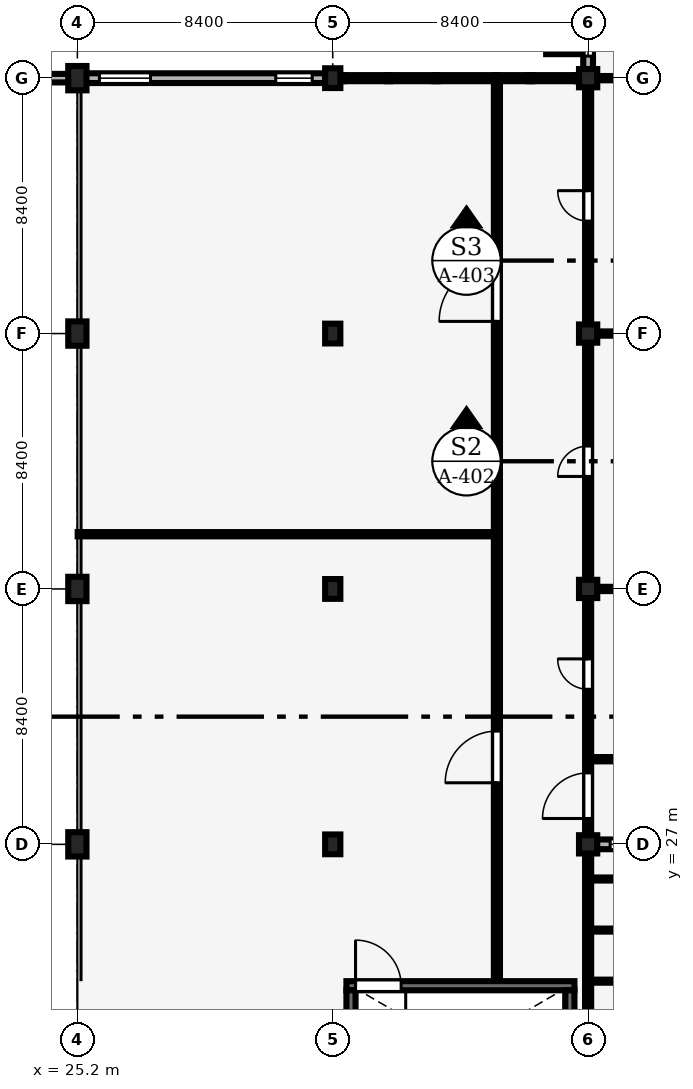
"""IFC4 building model, lengths in metres.
Left out: names, types, materials, properties, quantities, classifications, styles, units other than length and angle.
Written with IfcOpenShell. Run it as: python <this file> out.ifc"""

import sys

from ifc_helpers import new_model, si_unit, direction, frame, frame_2d, origin, origin_2d, place, context, subcontext, project, spatial, rectangle, extrude, element, fill, save


model = new_model("IFC4")
c1 = context("Model", 3, precision=1e-05, world=origin(), true_north=direction((0.0, 1.0)))
c2 = subcontext(c1, "Body", "Model", "MODEL_VIEW")
j1 = project(units=[si_unit("LENGTHUNIT", "METRE"), si_unit("PLANEANGLEUNIT", "RADIAN")], contexts=[c1])
p1 = place(None, origin())
s1 = spatial("IfcSite", under=j1, at=p1, CompositionType="ELEMENT")
p2 = place(p1, origin())
s2 = spatial("IfcBuilding", under=s1, at=p2, CompositionType="ELEMENT")
p3 = place(p2, frame((0.0, 0.0, 4.8)))
s3 = spatial("IfcBuildingStorey", under=s2, at=p3, CompositionType="ELEMENT", Elevation=4.8)
for number, where, z_axis, x_axis in (
    (1, (25.2, 27.0, 0.0), (0.0, 0.0, 1.0), (1.0, 0.0, 0.0)),
    (2, (25.2, 35.4, 0.0), (0.0, 0.0, 1.0), (1.0, 0.0, 0.0)),
    (3, (25.2, 43.8, 0.0), (0.0, 0.0, 1.0), (1.0, 0.0, 0.0)),
    (4, (25.2, 52.2, 0.0), (0.0, 0.0, 1.0), (1.0, 0.0, 0.0)),
):
    element("IfcColumn", number, at=place(p3, frame(where, z_axis=z_axis, x_axis=x_axis)), inside=s3, PredefinedType="COLUMN", context=c2, shape_type="SweptSolid", body=[
        extrude(rectangle(XDim=0.6, YDim=0.8, at=origin_2d()), origin(), (0.0, 0.0, 1.0), 4.2),
    ])
for number, where, z_axis, x_axis in (
    (5, (33.6, 27.0, 0.0), (0.0, 0.0, 1.0), (1.0, 0.0, 0.0)),
    (6, (33.6, 35.4, 0.0), (0.0, 0.0, 1.0), (1.0, 0.0, 0.0)),
    (7, (33.6, 43.8, 0.0), (0.0, 0.0, 1.0), (1.0, 0.0, 0.0)),
    (8, (33.6, 52.2, 0.0), (0.0, 0.0, 1.0), (1.0, 0.0, 0.0)),
):
    element("IfcColumn", number, at=place(p3, frame(where, z_axis=z_axis, x_axis=x_axis)), inside=s3, PredefinedType="COLUMN", context=c2, shape_type="SweptSolid", body=[
        extrude(rectangle(XDim=0.5, YDim=0.65, at=origin_2d()), origin(), (0.0, 0.0, 1.0), 4.2),
    ])
for number, where, z_axis, x_axis in (
    (9, (42.0, 27.0, 0.0), (0.0, 0.0, 1.0), (1.0, 0.0, 0.0)),
    (10, (42.0, 35.4, 0.0), (0.0, 0.0, 1.0), (1.0, 0.0, 0.0)),
    (11, (42.0, 43.8, 0.0), (0.0, 0.0, 1.0), (1.0, 0.0, 0.0)),
    (12, (42.0, 52.2, 0.0), (0.0, 0.0, 1.0), (1.0, 0.0, 0.0)),
):
    element("IfcColumn", number, at=place(p3, frame(where, z_axis=z_axis, x_axis=x_axis)), inside=s3, PredefinedType="COLUMN", context=c2, shape_type="SweptSolid", body=[
        extrude(rectangle(XDim=0.6, YDim=0.6, at=origin_2d()), origin(), (0.0, 0.0, 1.0), 4.2),
    ])
p4 = place(p3, frame((42.0, 52.475, 0.0), z_axis=(0.0, 0.0, 1.0), x_axis=(0.0, 1.0, 0.0)))
e13 = element("IfcWall", 13, at=p4, inside=s3, PredefinedType="SOLIDWALL", context=c2, shape_type="SweptSolid", body=[
    extrude(rectangle(XDim=7.85, YDim=0.32, at=frame_2d((3.925, 0.0))), origin(), (0.0, 0.0, 1.0), 3.352),
])
p5 = place(p4, frame((0.45, 0.0, 0.85)))
e14 = element("IfcOpeningElement", 14, at=p5, cuts=e13, PredefinedType="OPENING", context=c2, shape_type="SweptSolid", body=[
    extrude(rectangle(XDim=1.2, YDim=1.5, at=frame_2d((0.6, 0.75))), frame((0.0, 0.17, 0.0), z_axis=(0.0, -1.0, 0.0), x_axis=(1.0, 0.0, 0.0)), (0.0, 0.0, 1.0), 0.34),
])
p6 = place(p4, frame((6.2, 0.0, 0.85)))
e15 = element("IfcOpeningElement", 15, at=p6, cuts=e13, PredefinedType="OPENING", context=c2, shape_type="SweptSolid", body=[
    extrude(rectangle(XDim=1.2, YDim=1.5, at=frame_2d((0.6, 0.75))), frame((0.0, 0.17, 0.0), z_axis=(0.0, -1.0, 0.0), x_axis=(1.0, 0.0, 0.0)), (0.0, 0.0, 1.0), 0.34),
])
p7 = place(p3, frame((25.475, 52.2, 0.0), z_axis=(0.0, 0.0, 1.0), x_axis=(1.0, 0.0, 0.0)))
e16 = element("IfcWall", 16, at=p7, inside=s3, PredefinedType="SOLIDWALL", context=c2, shape_type="SweptSolid", body=[
    extrude(rectangle(XDim=7.9, YDim=0.32, at=frame_2d((3.95, 0.0))), origin(), (0.0, 0.0, 1.0), 3.48),
])
p8 = place(p7, frame((0.45, 0.0, 0.9)))
e17 = element("IfcOpeningElement", 17, at=p8, cuts=e16, PredefinedType="OPENING", context=c2, shape_type="SweptSolid", body=[
    extrude(rectangle(XDim=1.68, YDim=2.4, at=frame_2d((0.84, 1.2))), frame((0.0, 0.17, 0.0), z_axis=(0.0, -1.0, 0.0), x_axis=(1.0, 0.0, 0.0)), (0.0, 0.0, 1.0), 0.34),
])
p9 = place(p7, frame((6.25, 0.0, 0.9)))
e18 = element("IfcOpeningElement", 18, at=p9, cuts=e16, PredefinedType="OPENING", context=c2, shape_type="SweptSolid", body=[
    extrude(rectangle(XDim=1.2, YDim=1.5, at=frame_2d((0.6, 0.75))), frame((0.0, 0.17, 0.0), z_axis=(0.0, -1.0, 0.0), x_axis=(1.0, 0.0, 0.0)), (0.0, 0.0, 1.0), 0.34),
])
p10 = place(p3, frame((17.075, 52.2, 0.0), z_axis=(0.0, 0.0, 1.0), x_axis=(1.0, 0.0, 0.0)))
e19 = element("IfcWall", 19, at=p10, inside=s3, PredefinedType="SOLIDWALL", context=c2, shape_type="SweptSolid", body=[
    extrude(rectangle(XDim=7.85, YDim=0.28, at=frame_2d((3.925, 0.0))), origin(), (0.0, 0.0, 1.0), 2.759),
])
p11 = place(p10, frame((2.425, 0.0, 1.25)))
e20 = element("IfcOpeningElement", 20, at=p11, cuts=e19, PredefinedType="OPENING", context=c2, shape_type="SweptSolid", body=[
    extrude(rectangle(XDim=3.0, YDim=1.359, at=frame_2d((1.5, 0.679))), frame((0.0, 0.15, 0.0), z_axis=(0.0, -1.0, 0.0), x_axis=(1.0, 0.0, 0.0)), (0.0, 0.0, 1.0), 0.3),
])
p12 = place(p3, frame((42.275, 27.0, 0.0), z_axis=(0.0, 0.0, 1.0), x_axis=(1.0, 0.0, 0.0)))
e21 = element("IfcWall", 21, at=p12, inside=s3, PredefinedType="SOLIDWALL", context=c2, shape_type="SweptSolid", body=[
    extrude(rectangle(XDim=7.85, YDim=0.32, at=frame_2d((3.925, 0.0))), origin(), (0.0, 0.0, 1.0), 3.13),
])
p13 = place(p12, frame((0.45, 0.0, 0.9)))
e22 = element("IfcOpeningElement", 22, at=p13, cuts=e21, PredefinedType="OPENING", context=c2, shape_type="SweptSolid", body=[
    extrude(rectangle(XDim=1.2, YDim=1.5, at=frame_2d((0.6, 0.75))), frame((0.0, 0.17, 0.0), z_axis=(0.0, -1.0, 0.0), x_axis=(1.0, 0.0, 0.0)), (0.0, 0.0, 1.0), 0.34),
])
p14 = place(p12, frame((6.2, 0.0, 0.9)))
e23 = element("IfcOpeningElement", 23, at=p14, cuts=e21, PredefinedType="OPENING", context=c2, shape_type="SweptSolid", body=[
    extrude(rectangle(XDim=1.2, YDim=1.8, at=frame_2d((0.6, 0.9))), frame((0.0, 0.17, 0.0), z_axis=(0.0, -1.0, 0.0), x_axis=(1.0, 0.0, 0.0)), (0.0, 0.0, 1.0), 0.34),
])
p15 = place(p3, frame((34.05, 22.35, 0.0), z_axis=(0.0, 0.0, 1.0), x_axis=(1.0, 0.0, 0.0)))
e24 = element("IfcWall", 24, at=p15, inside=s3, PredefinedType="SHEAR", context=c2, shape_type="SweptSolid", body=[
    extrude(rectangle(XDim=7.5, YDim=0.3, at=frame_2d((3.75, 0.0))), origin(), (0.0, 0.0, 1.0), 4.025),
])
p16 = place(p15, frame((0.3, 0.0, 0.0)))
e25 = element("IfcOpeningElement", 25, at=p16, cuts=e24, PredefinedType="OPENING", context=c2, shape_type="SweptSolid", body=[
    extrude(rectangle(XDim=1.5, YDim=2.2, at=frame_2d((0.75, 1.1))), frame((0.0, 0.16, 0.0), z_axis=(0.0, -1.0, 0.0), x_axis=(1.0, 0.0, 0.0)), (0.0, 0.0, 1.0), 0.32),
])
for number, where, z_axis, x_axis in (
    (26, (34.2, 18.3, 0.0), (0.0, 0.0, 1.0), (0.0, 1.0, 0.0)),
    (27, (41.4, 18.3, 0.0), (0.0, 0.0, 1.0), (0.0, 1.0, 0.0)),
):
    element("IfcWall", number, at=place(p3, frame(where, z_axis=z_axis, x_axis=x_axis)), inside=s3, PredefinedType="SHEAR", context=c2, shape_type="SweptSolid", body=[
        extrude(rectangle(XDim=3.9, YDim=0.3, at=frame_2d((1.95, 0.0))), origin(), (0.0, 0.0, 1.0), 4.025),
    ])
p17 = place(p3, frame((25.21, 37.2, 0.0), z_axis=(0.0, 0.0, 1.0), x_axis=(1.0, 0.0, 0.0)))
e28 = element("IfcWall", 28, at=p17, inside=s3, PredefinedType="PARTITIONING", context=c2, shape_type="SweptSolid", body=[
    extrude(rectangle(XDim=13.685, YDim=0.14, at=frame_2d((6.843, 0.0))), origin(), (0.0, 0.0, 1.0), 3.9),
])
p18 = place(p3, frame((39.0, 22.56, 0.0), z_axis=(0.0, 0.0, 1.0), x_axis=(0.0, 1.0, 0.0)))
e29 = element("IfcWall", 29, at=p18, inside=s3, PredefinedType="PARTITIONING", context=c2, shape_type="SweptSolid", body=[
    extrude(rectangle(XDim=29.535, YDim=0.2, at=frame_2d((14.768, 0.0))), origin(), (0.0, 0.0, 1.0), 3.9),
])
p19 = place(p18, frame((6.465, 0.0, 0.0)))
e30 = element("IfcOpeningElement", 30, at=p19, cuts=e29, PredefinedType="OPENING", context=c2, shape_type="SweptSolid", body=[
    extrude(rectangle(XDim=1.7, YDim=2.25, at=frame_2d((0.85, 1.125))), frame((0.0, 0.11, 0.0), z_axis=(0.0, -1.0, 0.0), x_axis=(1.0, 0.0, 0.0)), (0.0, 0.0, 1.0), 0.22),
])
p20 = place(p18, frame((21.64, 0.0, 0.0)))
e31 = element("IfcOpeningElement", 31, at=p20, cuts=e29, PredefinedType="OPENING", context=c2, shape_type="SweptSolid", body=[
    extrude(rectangle(XDim=1.9, YDim=2.4, at=frame_2d((0.95, 1.2))), frame((0.0, 0.11, 0.0), z_axis=(0.0, -1.0, 0.0), x_axis=(1.0, 0.0, 0.0)), (0.0, 0.0, 1.0), 0.22),
])
p21 = place(p3, frame((42.105, 29.8, 0.0), z_axis=(0.0, 0.0, 1.0), x_axis=(1.0, 0.0, 0.0)))
e32 = element("IfcWall", 32, at=p21, inside=s3, PredefinedType="PARTITIONING", context=c2, shape_type="SweptSolid", body=[
    extrude(rectangle(XDim=5.19, YDim=0.14, at=frame_2d((2.595, 0.0))), origin(), (0.0, 0.0, 1.0), 3.43),
])
p22 = place(p3, frame((42.105, 35.4, 0.0), z_axis=(0.0, 0.0, 1.0), x_axis=(1.0, 0.0, 0.0)))
e33 = element("IfcWall", 33, at=p22, inside=s3, PredefinedType="PARTITIONING", context=c2, shape_type="SweptSolid", body=[
    extrude(rectangle(XDim=5.19, YDim=0.14, at=frame_2d((2.595, 0.0))), origin(), (0.0, 0.0, 1.0), 3.23),
])
p23 = place(p3, frame((42.105, 43.8, 0.0), z_axis=(0.0, 0.0, 1.0), x_axis=(1.0, 0.0, 0.0)))
e34 = element("IfcWall", 34, at=p23, inside=s3, PredefinedType="PARTITIONING", context=c2, shape_type="SweptSolid", body=[
    extrude(rectangle(XDim=5.19, YDim=0.14, at=frame_2d((2.595, 0.0))), origin(), (0.0, 0.0, 1.0), 3.01),
])
p24 = place(p3, frame((42.165, 52.2, 0.0), z_axis=(0.0, 0.0, 1.0), x_axis=(1.0, 0.0, 0.0)))
e35 = element("IfcWall", 35, at=p24, inside=s3, PredefinedType="PARTITIONING", context=c2, shape_type="SweptSolid", body=[
    extrude(rectangle(XDim=5.13, YDim=0.14, at=frame_2d((2.565, 0.0))), origin(), (0.0, 0.0, 1.0), 3.21),
])
p25 = place(p3, frame((42.0, 27.165, 0.0), z_axis=(0.0, 0.0, 1.0), x_axis=(0.0, 1.0, 0.0)))
e36 = element("IfcWall", 36, at=p25, inside=s3, PredefinedType="PARTITIONING", context=c2, shape_type="SweptSolid", body=[
    extrude(rectangle(XDim=7.925, YDim=0.2, at=frame_2d((3.962, 0.0))), origin(), (0.0, 0.0, 1.0), 3.272),
])
p26 = place(p25, frame((0.685, 0.0, 0.0)))
e37 = element("IfcOpeningElement", 37, at=p26, cuts=e36, PredefinedType="OPENING", context=c2, shape_type="SweptSolid", body=[
    extrude(rectangle(XDim=1.5, YDim=2.2, at=frame_2d((0.75, 1.1))), frame((0.0, 0.11, 0.0), z_axis=(0.0, -1.0, 0.0), x_axis=(1.0, 0.0, 0.0)), (0.0, 0.0, 1.0), 0.22),
])
p27 = place(p25, frame((4.935, 0.0, 0.0)))
e38 = element("IfcOpeningElement", 38, at=p27, cuts=e36, PredefinedType="OPENING", context=c2, shape_type="SweptSolid", body=[
    extrude(rectangle(XDim=1.0, YDim=2.15, at=frame_2d((0.5, 1.075))), frame((0.0, 0.11, 0.0), z_axis=(0.0, -1.0, 0.0), x_axis=(1.0, 0.0, 0.0)), (0.0, 0.0, 1.0), 0.22),
])
p28 = place(p3, frame((42.0, 35.71, 0.0), z_axis=(0.0, 0.0, 1.0), x_axis=(0.0, 1.0, 0.0)))
e39 = element("IfcWall", 39, at=p28, inside=s3, PredefinedType="PARTITIONING", context=c2, shape_type="SweptSolid", body=[
    extrude(rectangle(XDim=7.78, YDim=0.2, at=frame_2d((3.89, 0.0))), origin(), (0.0, 0.0, 1.0), 3.352),
])
p29 = place(p28, frame((3.39, 0.0, 0.0)))
e40 = element("IfcOpeningElement", 40, at=p29, cuts=e39, PredefinedType="OPENING", context=c2, shape_type="SweptSolid", body=[
    extrude(rectangle(XDim=1.0, YDim=2.15, at=frame_2d((0.5, 1.075))), frame((0.0, 0.11, 0.0), z_axis=(0.0, -1.0, 0.0), x_axis=(1.0, 0.0, 0.0)), (0.0, 0.0, 1.0), 0.22),
])
p30 = place(p3, frame((42.0, 44.11, 0.0), z_axis=(0.0, 0.0, 1.0), x_axis=(0.0, 1.0, 0.0)))
e41 = element("IfcWall", 41, at=p30, inside=s3, PredefinedType="PARTITIONING", context=c2, shape_type="SweptSolid", body=[
    extrude(rectangle(XDim=7.985, YDim=0.2, at=frame_2d((3.992, 0.0))), origin(), (0.0, 0.0, 1.0), 3.352),
])
p31 = place(p30, frame((3.39, 0.0, 0.0)))
e42 = element("IfcOpeningElement", 42, at=p31, cuts=e41, PredefinedType="OPENING", context=c2, shape_type="SweptSolid", body=[
    extrude(rectangle(XDim=1.0, YDim=2.15, at=frame_2d((0.5, 1.075))), frame((0.0, 0.11, 0.0), z_axis=(0.0, -1.0, 0.0), x_axis=(1.0, 0.0, 0.0)), (0.0, 0.0, 1.0), 0.22),
])
p32 = place(p5, origin())
e43 = element("IfcWindow", 43, at=p32, inside=s3, PartitioningType="SINGLE_PANEL", PredefinedType="WINDOW", context=c2, shape_type="SweptSolid", body=[
    extrude(rectangle(XDim=1.2, YDim=1.5, at=frame_2d((0.6, 0.75))), frame((0.0, 0.03, 0.0), z_axis=(0.0, -1.0, 0.0), x_axis=(1.0, 0.0, 0.0)), (0.0, 0.0, 1.0), 0.06),
])
fill(e14, e43)
p33 = place(p8, origin())
e44 = element("IfcWindow", 44, at=p33, inside=s3, PartitioningType="SINGLE_PANEL", PredefinedType="WINDOW", context=c2, shape_type="SweptSolid", body=[
    extrude(rectangle(XDim=1.68, YDim=2.4, at=frame_2d((0.84, 1.2))), frame((0.0, 0.03, 0.0), z_axis=(0.0, -1.0, 0.0), x_axis=(1.0, 0.0, 0.0)), (0.0, 0.0, 1.0), 0.06),
])
fill(e17, e44)
p34 = place(p9, origin())
e45 = element("IfcWindow", 45, at=p34, inside=s3, PartitioningType="SINGLE_PANEL", PredefinedType="WINDOW", context=c2, shape_type="SweptSolid", body=[
    extrude(rectangle(XDim=1.2, YDim=1.5, at=frame_2d((0.6, 0.75))), frame((0.0, 0.03, 0.0), z_axis=(0.0, -1.0, 0.0), x_axis=(1.0, 0.0, 0.0)), (0.0, 0.0, 1.0), 0.06),
])
fill(e18, e45)
p35 = place(p13, origin())
e46 = element("IfcWindow", 46, at=p35, inside=s3, PartitioningType="SINGLE_PANEL", PredefinedType="WINDOW", context=c2, shape_type="SweptSolid", body=[
    extrude(rectangle(XDim=1.2, YDim=1.5, at=frame_2d((0.6, 0.75))), frame((0.0, 0.03, 0.0), z_axis=(0.0, -1.0, 0.0), x_axis=(1.0, 0.0, 0.0)), (0.0, 0.0, 1.0), 0.06),
])
fill(e22, e46)
p36 = place(p16, origin())
e47 = element("IfcDoor", 47, at=p36, inside=s3, OperationType="DOUBLE_DOOR_SINGLE_SWING", PredefinedType="DOOR", context=c2, shape_type="SweptSolid", body=[
    extrude(rectangle(XDim=1.5, YDim=2.2, at=frame_2d((0.75, 1.1))), frame((0.0, 0.025, 0.0), z_axis=(0.0, -1.0, 0.0), x_axis=(1.0, 0.0, 0.0)), (0.0, 0.0, 1.0), 0.05),
])
fill(e25, e47)
p37 = place(p19, origin())
e48 = element("IfcDoor", 48, at=p37, inside=s3, OperationType="DOUBLE_DOOR_SINGLE_SWING", PredefinedType="DOOR", context=c2, shape_type="SweptSolid", body=[
    extrude(rectangle(XDim=1.7, YDim=2.25, at=frame_2d((0.85, 1.125))), frame((0.0, 0.025, 0.0), z_axis=(0.0, -1.0, 0.0), x_axis=(1.0, 0.0, 0.0)), (0.0, 0.0, 1.0), 0.05),
])
fill(e30, e48)
p38 = place(p20, origin())
e49 = element("IfcDoor", 49, at=p38, inside=s3, OperationType="DOUBLE_DOOR_SINGLE_SWING", PredefinedType="DOOR", context=c2, shape_type="SweptSolid", body=[
    extrude(rectangle(XDim=1.9, YDim=2.4, at=frame_2d((0.95, 1.2))), frame((0.0, 0.025, 0.0), z_axis=(0.0, -1.0, 0.0), x_axis=(1.0, 0.0, 0.0)), (0.0, 0.0, 1.0), 0.05),
])
fill(e31, e49)
p39 = place(p26, origin())
e50 = element("IfcDoor", 50, at=p39, inside=s3, OperationType="DOUBLE_DOOR_SINGLE_SWING", PredefinedType="DOOR", context=c2, shape_type="SweptSolid", body=[
    extrude(rectangle(XDim=1.5, YDim=2.2, at=frame_2d((0.75, 1.1))), frame((0.0, 0.025, 0.0), z_axis=(0.0, -1.0, 0.0), x_axis=(1.0, 0.0, 0.0)), (0.0, 0.0, 1.0), 0.05),
])
fill(e37, e50)
p40 = place(p27, origin())
e51 = element("IfcDoor", 51, at=p40, inside=s3, OperationType="SINGLE_SWING_RIGHT", PredefinedType="DOOR", context=c2, shape_type="SweptSolid", body=[
    extrude(rectangle(XDim=1.0, YDim=2.15, at=frame_2d((0.5, 1.075))), frame((0.0, 0.025, 0.0), z_axis=(0.0, -1.0, 0.0), x_axis=(1.0, 0.0, 0.0)), (0.0, 0.0, 1.0), 0.05),
])
fill(e38, e51)
p41 = place(p29, origin())
e52 = element("IfcDoor", 52, at=p41, inside=s3, OperationType="SINGLE_SWING_LEFT", PredefinedType="DOOR", context=c2, shape_type="SweptSolid", body=[
    extrude(rectangle(XDim=1.0, YDim=2.15, at=frame_2d((0.5, 1.075))), frame((0.0, 0.025, 0.0), z_axis=(0.0, -1.0, 0.0), x_axis=(1.0, 0.0, 0.0)), (0.0, 0.0, 1.0), 0.05),
])
fill(e40, e52)
p42 = place(p31, origin())
e53 = element("IfcDoor", 53, at=p42, inside=s3, OperationType="SINGLE_SWING_RIGHT", PredefinedType="DOOR", context=c2, shape_type="SweptSolid", body=[
    extrude(rectangle(XDim=1.0, YDim=2.15, at=frame_2d((0.5, 1.075))), frame((0.0, 0.025, 0.0), z_axis=(0.0, -1.0, 0.0), x_axis=(1.0, 0.0, 0.0)), (0.0, 0.0, 1.0), 0.05),
])
fill(e42, e53)
save(model, sys.argv[1])
